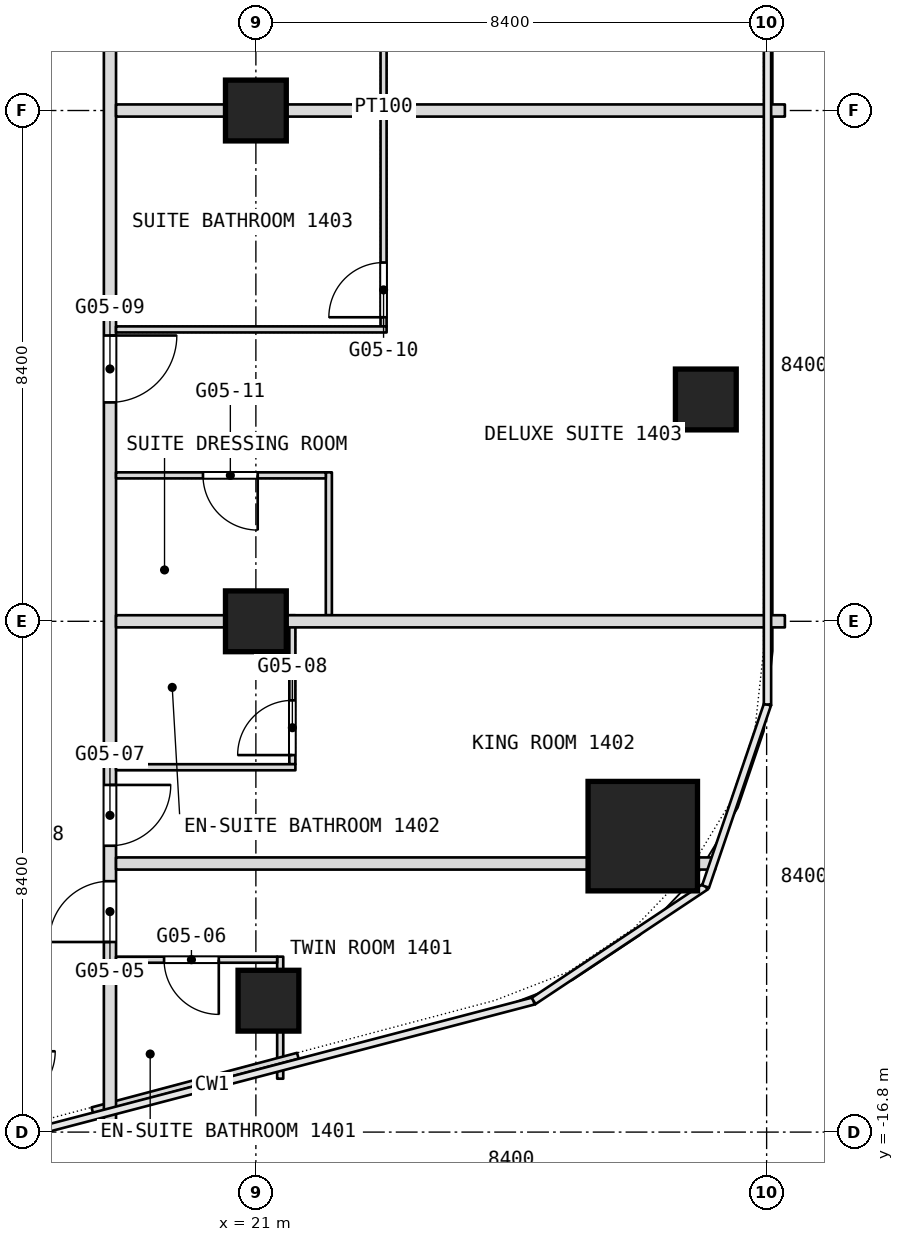
"""IFC4 building model, lengths in metres.
Left out: names, types, materials, properties, quantities, classifications, styles, units other than length and angle.
Written with IfcOpenShell. Run it as: python <this file> out.ifc"""

import sys

from ifc_helpers import new_model, si_unit, direction, frame, frame_2d, origin, origin_2d, place, context, subcontext, project, spatial, rectangle, extrude, element, fill, save


model = new_model("IFC4")
c1 = context("Model", 3, precision=1e-05, world=origin(), true_north=direction((0.0, 1.0)))
c2 = subcontext(c1, "Body", "Model", "MODEL_VIEW")
j1 = project(units=[si_unit("LENGTHUNIT", "METRE"), si_unit("PLANEANGLEUNIT", "RADIAN")], contexts=[c1])
p1 = place(None, origin())
s1 = spatial("IfcSite", under=j1, at=p1, CompositionType="ELEMENT")
p2 = place(p1, origin())
s2 = spatial("IfcBuilding", under=s1, at=p2, CompositionType="ELEMENT")
p3 = place(p2, frame((0.0, 0.0, 65.3)))
s3 = spatial("IfcBuildingStorey", under=s2, at=p3, CompositionType="ELEMENT", Elevation=65.3)
p4 = place(p3, frame((27.363, -11.933, 0.0), z_axis=(0.0, 0.0, 1.0), x_axis=(1.0, 0.0, 0.0)))
e1 = element("IfcColumn", 1, at=p4, inside=s3, PredefinedType="COLUMN", context=c2, shape_type="SweptSolid", body=[
    extrude(rectangle(XDim=1.8, YDim=1.8, at=origin_2d()), origin(), (0.0, 0.0, 1.0), 3.6),
])
for number, where, z_axis, x_axis in (
    (2, (21.0, -8.4, 0.0), (0.0, 0.0, 1.0), (1.0, 0.0, 0.0)),
    (3, (21.0, 0.0, 0.0), (0.0, 0.0, 1.0), (1.0, 0.0, 0.0)),
    (4, (28.4, -4.752, 0.0), (0.0, 0.0, 1.0), (1.0, 0.0, 0.0)),
    (5, (21.207, -14.639, 0.0), (0.0, 0.0, 1.0), (1.0, 0.0, 0.0)),
):
    element("IfcColumn", number, at=place(p3, frame(where, z_axis=z_axis, x_axis=x_axis)), inside=s3, PredefinedType="COLUMN", context=c2, shape_type="SweptSolid", body=[
        extrude(rectangle(XDim=1.0, YDim=1.0, at=origin_2d()), origin(), (0.0, 0.0, 1.0), 3.6),
    ])
p5 = place(p3, frame((23.1, -3.55, 0.0), z_axis=(0.0, 0.0, 1.0), x_axis=(0.0, 1.0, 0.0)))
e6 = element("IfcWall", 6, at=p5, inside=s3, PredefinedType="PARTITIONING", context=c2, shape_type="SweptSolid", body=[
    extrude(rectangle(XDim=7.2, YDim=0.1, at=frame_2d((3.6, 0.0))), origin(), (0.0, 0.0, 1.0), 3.34),
])
p6 = place(p5, frame((0.15, 0.0, 0.0)))
e7 = element("IfcOpeningElement", 7, at=p6, cuts=e6, PredefinedType="OPENING", context=c2, shape_type="SweptSolid", body=[
    extrude(rectangle(XDim=0.9, YDim=2.1, at=frame_2d((0.45, 1.05))), frame((0.0, 0.05, 0.0), z_axis=(0.0, -1.0, 0.0), x_axis=(1.0, 0.0, 0.0)), (0.0, 0.0, 1.0), 0.1),
])
p7 = place(p3, frame((22.2, -8.3, 0.0), z_axis=(0.0, 0.0, 1.0), x_axis=(0.0, 1.0, 0.0)))
e8 = element("IfcWall", 8, at=p7, inside=s3, PredefinedType="PARTITIONING", context=c2, shape_type="SweptSolid", body=[
    extrude(rectangle(XDim=2.35, YDim=0.1, at=frame_2d((1.175, 0.0))), origin(), (0.0, 0.0, 1.0), 3.34),
])
p8 = place(p3, frame((21.6, -10.75, 0.0), z_axis=(0.0, 0.0, 1.0), x_axis=(0.0, 1.0, 0.0)))
e9 = element("IfcWall", 9, at=p8, inside=s3, PredefinedType="PARTITIONING", context=c2, shape_type="SweptSolid", body=[
    extrude(rectangle(XDim=2.45, YDim=0.1, at=frame_2d((1.225, 0.0))), origin(), (0.0, 0.0, 1.0), 3.34),
])
p9 = place(p8, frame((0.15, 0.0, 0.0)))
e10 = element("IfcOpeningElement", 10, at=p9, cuts=e9, PredefinedType="OPENING", context=c2, shape_type="SweptSolid", body=[
    extrude(rectangle(XDim=0.9, YDim=2.1, at=frame_2d((0.45, 1.05))), frame((0.0, 0.05, 0.0), z_axis=(0.0, -1.0, 0.0), x_axis=(1.0, 0.0, 0.0)), (0.0, 0.0, 1.0), 0.1),
])
p10 = place(p3, frame((21.4, -15.922, 0.0), z_axis=(0.0, 0.0, 1.0), x_axis=(0.0, 1.0, 0.0)))
e11 = element("IfcWall", 11, at=p10, inside=s3, PredefinedType="PARTITIONING", context=c2, shape_type="SweptSolid", body=[
    extrude(rectangle(XDim=2.007, YDim=0.1, at=frame_2d((1.003, 0.0))), origin(), (0.0, 0.0, 1.0), 3.34),
])
p11 = place(p3, frame((18.31, -16.442, 0.0), z_axis=(0.0, 0.0, 1.0), x_axis=(0.966542484633, 0.25650657964, 0.0)))
e12 = element("IfcWall", 12, at=p11, inside=s3, PredefinedType="PARTITIONING", context=c2, shape_type="SweptSolid", body=[
    extrude(rectangle(XDim=3.497, YDim=0.1, at=frame_2d((1.749, 0.0))), origin(), (0.0, 0.0, 1.0), 3.34),
])
p12 = place(p3, frame((18.6, -16.665, 0.0), z_axis=(0.0, 0.0, 1.0), x_axis=(0.0, 1.0, 0.0)))
e13 = element("IfcWall", 13, at=p12, inside=s3, PredefinedType="PARTITIONING", context=c2, shape_type="SweptSolid", body=[
    extrude(rectangle(XDim=50.205, YDim=0.2, at=frame_2d((25.103, 0.0))), origin(), (0.0, 0.0, 1.0), 3.34),
])
p13 = place(p12, frame((2.991, 0.0, 0.0)))
e14 = element("IfcOpeningElement", 14, at=p13, cuts=e13, PredefinedType="OPENING", context=c2, shape_type="SweptSolid", body=[
    extrude(rectangle(XDim=1.0, YDim=2.1, at=frame_2d((0.5, 1.05))), frame((0.0, 0.1, 0.0), z_axis=(0.0, -1.0, 0.0), x_axis=(1.0, 0.0, 0.0)), (0.0, 0.0, 1.0), 0.2),
])
p14 = place(p12, frame((4.574, 0.0, 0.0)))
e15 = element("IfcOpeningElement", 15, at=p14, cuts=e13, PredefinedType="OPENING", context=c2, shape_type="SweptSolid", body=[
    extrude(rectangle(XDim=1.0, YDim=2.1, at=frame_2d((0.5, 1.05))), frame((0.0, 0.1, 0.0), z_axis=(0.0, -1.0, 0.0), x_axis=(1.0, 0.0, 0.0)), (0.0, 0.0, 1.0), 0.2),
])
p15 = place(p12, frame((11.865, 0.0, 0.0)))
e16 = element("IfcOpeningElement", 16, at=p15, cuts=e13, PredefinedType="OPENING", context=c2, shape_type="SweptSolid", body=[
    extrude(rectangle(XDim=1.1, YDim=2.1, at=frame_2d((0.55, 1.05))), frame((0.0, 0.1, 0.0), z_axis=(0.0, -1.0, 0.0), x_axis=(1.0, 0.0, 0.0)), (0.0, 0.0, 1.0), 0.2),
])
p16 = place(p12, frame((20.365, 0.0, 0.0)))
e17 = element("IfcOpeningElement", 17, at=p16, cuts=e13, PredefinedType="OPENING", context=c2, shape_type="SweptSolid", body=[
    extrude(rectangle(XDim=1.1, YDim=2.1, at=frame_2d((0.55, 1.05))), frame((0.0, 0.1, 0.0), z_axis=(0.0, -1.0, 0.0), x_axis=(1.0, 0.0, 0.0)), (0.0, 0.0, 1.0), 0.2),
])
p17 = place(p12, frame((25.465, 0.0, 0.0)))
e18 = element("IfcOpeningElement", 18, at=p17, cuts=e13, PredefinedType="OPENING", context=c2, shape_type="SweptSolid", body=[
    extrude(rectangle(XDim=1.0, YDim=2.1, at=frame_2d((0.5, 1.05))), frame((0.0, 0.1, 0.0), z_axis=(0.0, -1.0, 0.0), x_axis=(1.0, 0.0, 0.0)), (0.0, 0.0, 1.0), 0.2),
])
p18 = place(p12, frame((32.065, 0.0, 0.0)))
e19 = element("IfcOpeningElement", 19, at=p18, cuts=e13, PredefinedType="OPENING", context=c2, shape_type="SweptSolid", body=[
    extrude(rectangle(XDim=1.0, YDim=2.1, at=frame_2d((0.5, 1.05))), frame((0.0, 0.1, 0.0), z_axis=(0.0, -1.0, 0.0), x_axis=(1.0, 0.0, 0.0)), (0.0, 0.0, 1.0), 0.2),
])
p19 = place(p12, frame((36.265, 0.0, 0.0)))
e20 = element("IfcOpeningElement", 20, at=p19, cuts=e13, PredefinedType="OPENING", context=c2, shape_type="SweptSolid", body=[
    extrude(rectangle(XDim=1.0, YDim=2.1, at=frame_2d((0.5, 1.05))), frame((0.0, 0.1, 0.0), z_axis=(0.0, -1.0, 0.0), x_axis=(1.0, 0.0, 0.0)), (0.0, 0.0, 1.0), 0.2),
])
p20 = place(p12, frame((38.065, 0.0, 0.0)))
e21 = element("IfcOpeningElement", 21, at=p20, cuts=e13, PredefinedType="OPENING", context=c2, shape_type="SweptSolid", body=[
    extrude(rectangle(XDim=1.0, YDim=2.1, at=frame_2d((0.5, 1.05))), frame((0.0, 0.1, 0.0), z_axis=(0.0, -1.0, 0.0), x_axis=(1.0, 0.0, 0.0)), (0.0, 0.0, 1.0), 0.2),
])
p21 = place(p12, frame((45.465, 0.0, 0.0)))
e22 = element("IfcOpeningElement", 22, at=p21, cuts=e13, PredefinedType="OPENING", context=c2, shape_type="SweptSolid", body=[
    extrude(rectangle(XDim=1.1, YDim=2.1, at=frame_2d((0.55, 1.05))), frame((0.0, 0.1, 0.0), z_axis=(0.0, -1.0, 0.0), x_axis=(1.0, 0.0, 0.0)), (0.0, 0.0, 1.0), 0.2),
])
p22 = place(p3, frame((18.7, -13.965, 0.0), z_axis=(0.0, 0.0, 1.0), x_axis=(1.0, 0.0, 0.0)))
e23 = element("IfcWall", 23, at=p22, inside=s3, PredefinedType="PARTITIONING", context=c2, shape_type="SweptSolid", body=[
    extrude(rectangle(XDim=2.65, YDim=0.1, at=frame_2d((1.325, 0.0))), origin(), (0.0, 0.0, 1.0), 3.34),
])
p23 = place(p22, frame((0.79, 0.0, 0.0)))
e24 = element("IfcOpeningElement", 24, at=p23, cuts=e23, PredefinedType="OPENING", context=c2, shape_type="SweptSolid", body=[
    extrude(rectangle(XDim=0.9, YDim=2.1, at=frame_2d((0.45, 1.05))), frame((0.0, 0.05, 0.0), z_axis=(0.0, -1.0, 0.0), x_axis=(1.0, 0.0, 0.0)), (0.0, 0.0, 1.0), 0.1),
])
p24 = place(p3, frame((18.7, -12.383, 0.0), z_axis=(0.0, 0.0, 1.0), x_axis=(1.0, 0.0, 0.0)))
e25 = element("IfcWall", 25, at=p24, inside=s3, PredefinedType="PARTITIONING", context=c2, shape_type="SweptSolid", body=[
    extrude(rectangle(XDim=7.763, YDim=0.2, at=frame_2d((3.881, 0.0))), origin(), (0.0, 0.0, 1.0), 3.34),
])
p25 = place(p3, frame((28.263, -12.383, 0.0), z_axis=(0.0, 0.0, 1.0), x_axis=(1.0, 0.0, 0.0)))
e26 = element("IfcWall", 26, at=p25, inside=s3, PredefinedType="PARTITIONING", context=c2, shape_type="SweptSolid", body=[
    extrude(rectangle(XDim=0.29, YDim=0.2, at=frame_2d((0.145, 0.0))), origin(), (0.0, 0.0, 1.0), 3.34),
])
p26 = place(p3, frame((18.7, -10.8, 0.0), z_axis=(0.0, 0.0, 1.0), x_axis=(1.0, 0.0, 0.0)))
e27 = element("IfcWall", 27, at=p26, inside=s3, PredefinedType="PARTITIONING", context=c2, shape_type="SweptSolid", body=[
    extrude(rectangle(XDim=2.95, YDim=0.1, at=frame_2d((1.475, 0.0))), origin(), (0.0, 0.0, 1.0), 3.34),
])
p27 = place(p3, frame((18.7, -8.4, 0.0), z_axis=(0.0, 0.0, 1.0), x_axis=(1.0, 0.0, 0.0)))
e28 = element("IfcWall", 28, at=p27, inside=s3, PredefinedType="PARTITIONING", context=c2, shape_type="SweptSolid", body=[
    extrude(rectangle(XDim=11.0, YDim=0.2, at=frame_2d((5.5, 0.0))), origin(), (0.0, 0.0, 1.0), 2.84),
])
p28 = place(p3, frame((18.7, -6.0, 0.0), z_axis=(0.0, 0.0, 1.0), x_axis=(1.0, 0.0, 0.0)))
e29 = element("IfcWall", 29, at=p28, inside=s3, PredefinedType="PARTITIONING", context=c2, shape_type="SweptSolid", body=[
    extrude(rectangle(XDim=3.45, YDim=0.1, at=frame_2d((1.725, 0.0))), origin(), (0.0, 0.0, 1.0), 3.34),
])
p29 = place(p28, frame((1.43, 0.0, 0.0)))
e30 = element("IfcOpeningElement", 30, at=p29, cuts=e29, PredefinedType="OPENING", context=c2, shape_type="SweptSolid", body=[
    extrude(rectangle(XDim=0.9, YDim=2.1, at=frame_2d((0.45, 1.05))), frame((0.0, 0.05, 0.0), z_axis=(0.0, -1.0, 0.0), x_axis=(1.0, 0.0, 0.0)), (0.0, 0.0, 1.0), 0.1),
])
p30 = place(p3, frame((18.7, -3.6, 0.0), z_axis=(0.0, 0.0, 1.0), x_axis=(1.0, 0.0, 0.0)))
e31 = element("IfcWall", 31, at=p30, inside=s3, PredefinedType="PARTITIONING", context=c2, shape_type="SweptSolid", body=[
    extrude(rectangle(XDim=4.45, YDim=0.1, at=frame_2d((2.225, 0.0))), origin(), (0.0, 0.0, 1.0), 3.34),
])
p31 = place(p3, frame((18.7, 0.0, 0.0), z_axis=(0.0, 0.0, 1.0), x_axis=(1.0, 0.0, 0.0)))
e32 = element("IfcWall", 32, at=p31, inside=s3, PredefinedType="PARTITIONING", context=c2, shape_type="SweptSolid", body=[
    extrude(rectangle(XDim=11.0, YDim=0.2, at=frame_2d((5.5, 0.0))), origin(), (0.0, 0.0, 1.0), 2.84),
])
p32 = place(p6, origin())
e33 = element("IfcDoor", 33, at=p32, inside=s3, OperationType="SINGLE_SWING_LEFT", PredefinedType="DOOR", context=c2, shape_type="SweptSolid", body=[
    extrude(rectangle(XDim=0.9, YDim=2.1, at=frame_2d((0.45, 1.05))), frame((0.0, 0.025, 0.0), z_axis=(0.0, -1.0, 0.0), x_axis=(1.0, 0.0, 0.0)), (0.0, 0.0, 1.0), 0.05),
])
fill(e7, e33)
p33 = place(p9, origin())
e34 = element("IfcDoor", 34, at=p33, inside=s3, OperationType="SINGLE_SWING_LEFT", PredefinedType="DOOR", context=c2, shape_type="SweptSolid", body=[
    extrude(rectangle(XDim=0.9, YDim=2.1, at=frame_2d((0.45, 1.05))), frame((0.0, 0.025, 0.0), z_axis=(0.0, -1.0, 0.0), x_axis=(1.0, 0.0, 0.0)), (0.0, 0.0, 1.0), 0.05),
])
fill(e10, e34)
p34 = place(p13, origin())
e35 = element("IfcDoor", 35, at=p34, inside=s3, OperationType="SINGLE_SWING_LEFT", PredefinedType="DOOR", context=c2, shape_type="SweptSolid", body=[
    extrude(rectangle(XDim=1.0, YDim=2.1, at=frame_2d((0.5, 1.05))), frame((0.0, 0.025, 0.0), z_axis=(0.0, -1.0, 0.0), x_axis=(1.0, 0.0, 0.0)), (0.0, 0.0, 1.0), 0.05),
])
fill(e14, e35)
p35 = place(p14, origin())
e36 = element("IfcDoor", 36, at=p35, inside=s3, OperationType="SINGLE_SWING_LEFT", PredefinedType="DOOR", context=c2, shape_type="SweptSolid", body=[
    extrude(rectangle(XDim=1.0, YDim=2.1, at=frame_2d((0.5, 1.05))), frame((0.0, 0.025, 0.0), z_axis=(0.0, -1.0, 0.0), x_axis=(1.0, 0.0, 0.0)), (0.0, 0.0, 1.0), 0.05),
])
fill(e15, e36)
p36 = place(p15, origin())
e37 = element("IfcDoor", 37, at=p36, inside=s3, OperationType="SINGLE_SWING_LEFT", PredefinedType="DOOR", context=c2, shape_type="SweptSolid", body=[
    extrude(rectangle(XDim=1.1, YDim=2.1, at=frame_2d((0.55, 1.05))), frame((0.0, 0.025, 0.0), z_axis=(0.0, -1.0, 0.0), x_axis=(1.0, 0.0, 0.0)), (0.0, 0.0, 1.0), 0.05),
])
fill(e16, e37)
p37 = place(p23, origin())
e38 = element("IfcDoor", 38, at=p37, inside=s3, OperationType="SINGLE_SWING_LEFT", PredefinedType="DOOR", context=c2, shape_type="SweptSolid", body=[
    extrude(rectangle(XDim=0.9, YDim=2.1, at=frame_2d((0.45, 1.05))), frame((0.0, 0.025, 0.0), z_axis=(0.0, -1.0, 0.0), x_axis=(1.0, 0.0, 0.0)), (0.0, 0.0, 1.0), 0.05),
])
fill(e24, e38)
p38 = place(p29, origin())
e39 = element("IfcDoor", 39, at=p38, inside=s3, OperationType="SINGLE_SWING_LEFT", PredefinedType="DOOR", context=c2, shape_type="SweptSolid", body=[
    extrude(rectangle(XDim=0.9, YDim=2.1, at=frame_2d((0.45, 1.05))), frame((0.0, 0.025, 0.0), z_axis=(0.0, -1.0, 0.0), x_axis=(1.0, 0.0, 0.0)), (0.0, 0.0, 1.0), 0.05),
])
fill(e30, e39)
save(model, sys.argv[1])
